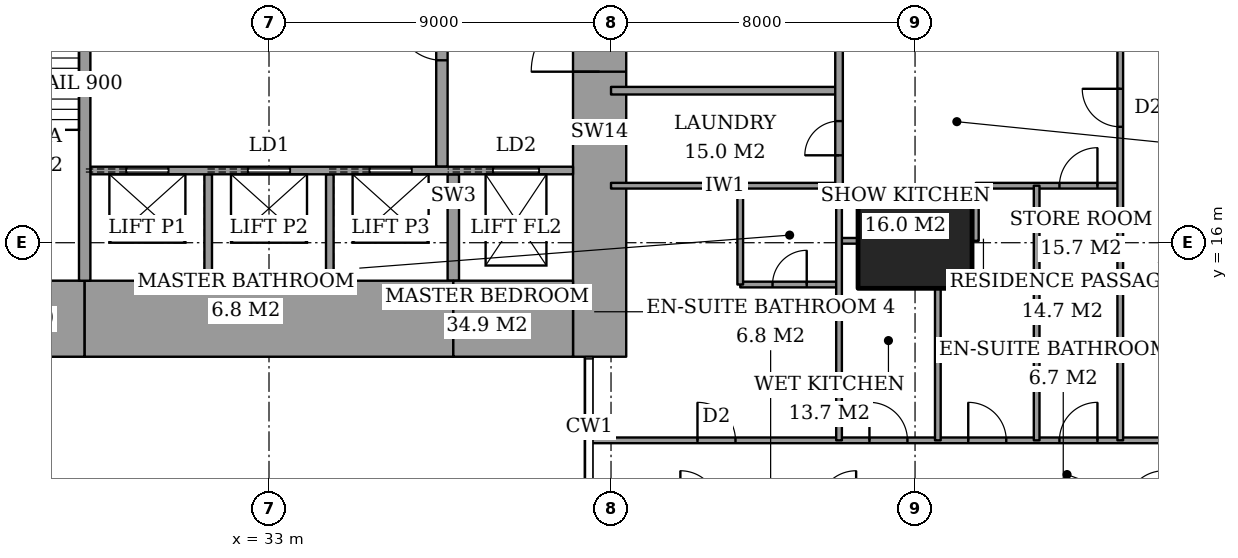
"""IFC4 building model, lengths in metres.
Left out: names, types, materials, properties, quantities, classifications, styles, units other than length and angle.
Written with IfcOpenShell. Run it as: python <this file> out.ifc"""

import sys

from ifc_helpers import new_model, si_unit, direction, frame, frame_2d, origin, origin_2d, place, context, subcontext, project, spatial, rectangle, extrude, element, fill, save


model = new_model("IFC4")
c1 = context("Model", 3, precision=1e-05, world=origin(), true_north=direction((0.0, 1.0)))
c2 = subcontext(c1, "Body", "Model", "MODEL_VIEW")
j1 = project(units=[si_unit("LENGTHUNIT", "METRE"), si_unit("PLANEANGLEUNIT", "RADIAN")], contexts=[c1])
p1 = place(None, origin())
s1 = spatial("IfcSite", under=j1, at=p1, CompositionType="ELEMENT")
p2 = place(p1, origin())
s2 = spatial("IfcBuilding", under=s1, at=p2, CompositionType="ELEMENT")
p3 = place(p2, frame((0.0, 0.0, 125.0)))
s3 = spatial("IfcBuildingStorey", under=s2, at=p3, CompositionType="ELEMENT", Elevation=125.0)
p4 = place(p3, frame((50.0, 16.0, 0.0), z_axis=(0.0, 0.0, 1.0), x_axis=(1.0, 0.0, 0.0)))
e1 = element("IfcColumn", 1, at=p4, inside=s3, PredefinedType="COLUMN", context=c2, shape_type="SweptSolid", body=[
    extrude(rectangle(XDim=3.0, YDim=2.4, at=origin_2d()), origin(), (0.0, 0.0, 1.0), 3.6),
])
p5 = place(p3, frame((25.0, 14.0, 0.0), z_axis=(0.0, 0.0, 1.0), x_axis=(1.0, 0.0, 0.0)))
e2 = element("IfcWall", 2, at=p5, inside=s3, PredefinedType="SHEAR", context=c2, shape_type="SweptSolid", body=[
    extrude(rectangle(XDim=3.15, YDim=2.0, at=frame_2d((1.575, 0.0))), origin(), (0.0, 0.0, 1.0), 3.6),
])
p6 = place(p3, frame((28.15, 14.0, 0.0), z_axis=(0.0, 0.0, 1.0), x_axis=(1.0, 0.0, 0.0)))
e3 = element("IfcWall", 3, at=p6, inside=s3, PredefinedType="SHEAR", context=c2, shape_type="SweptSolid", body=[
    extrude(rectangle(XDim=9.7, YDim=2.0, at=frame_2d((4.85, 0.0))), origin(), (0.0, 0.0, 1.0), 3.6),
])
p7 = place(p3, frame((37.85, 14.0, 0.0), z_axis=(0.0, 0.0, 1.0), x_axis=(1.0, 0.0, 0.0)))
e4 = element("IfcWall", 4, at=p7, inside=s3, PredefinedType="SHEAR", context=c2, shape_type="SweptSolid", body=[
    extrude(rectangle(XDim=3.15, YDim=2.0, at=frame_2d((1.575, 0.0))), origin(), (0.0, 0.0, 1.0), 3.6),
])
p8 = place(p3, frame((41.7, 13.0, 0.0), z_axis=(0.0, 0.0, 1.0), x_axis=(0.0, 1.0, 0.0)))
e5 = element("IfcWall", 5, at=p8, inside=s3, PredefinedType="SHEAR", context=c2, shape_type="SweptSolid", body=[
    extrude(rectangle(XDim=11.85, YDim=1.4, at=frame_2d((5.925, 0.0))), origin(), (0.0, 0.0, 1.0), 3.6),
])
p9 = place(p8, frame((7.5, 0.0, 0.0)))
e6 = element("IfcOpeningElement", 6, at=p9, cuts=e5, PredefinedType="OPENING", context=c2, shape_type="SweptSolid", body=[
    extrude(rectangle(XDim=1.8, YDim=2.4, at=frame_2d((0.9, 1.2))), frame((0.0, 0.71, 0.0), z_axis=(0.0, -1.0, 0.0), x_axis=(1.0, 0.0, 0.0)), (0.0, 0.0, 1.0), 1.42),
])
p10 = place(p3, frame((28.15, 15.0, 0.0), z_axis=(0.0, 0.0, 1.0), x_axis=(0.0, 1.0, 0.0)))
e7 = element("IfcWall", 7, at=p10, inside=s3, PredefinedType="SHEAR", context=c2, shape_type="SweptSolid", body=[
    extrude(rectangle(XDim=8.15, YDim=0.3, at=frame_2d((4.075, 0.0))), origin(), (0.0, 0.0, 1.0), 3.6),
])
p11 = place(p3, frame((37.55, 18.0, 0.0), z_axis=(0.0, 0.0, 1.0), x_axis=(0.0, 1.0, 0.0)))
e8 = element("IfcWall", 8, at=p11, inside=s3, PredefinedType="PARTITIONING", context=c2, shape_type="SweptSolid", body=[
    extrude(rectangle(XDim=6.7, YDim=0.3, at=frame_2d((3.35, 0.0))), origin(), (0.0, 0.0, 1.0), 3.6),
])
p12 = place(p11, frame((2.8, 0.0, 0.0)))
e9 = element("IfcOpeningElement", 9, at=p12, cuts=e8, PredefinedType="OPENING", context=c2, shape_type="SweptSolid", body=[
    extrude(rectangle(XDim=1.2, YDim=2.1, at=frame_2d((0.6, 1.05))), frame((0.0, 0.16, 0.0), z_axis=(0.0, -1.0, 0.0), x_axis=(1.0, 0.0, 0.0)), (0.0, 0.0, 1.0), 0.32),
])
p13 = place(p3, frame((41.439, 10.8, 0.0), z_axis=(0.0, 0.0, 1.0), x_axis=(1.0, 0.0, 0.0)))
e10 = element("IfcWall", 10, at=p13, inside=s3, PredefinedType="PARTITIONING", context=c2, shape_type="SweptSolid", body=[
    extrude(rectangle(XDim=25.011, YDim=0.15, at=frame_2d((12.505, 0.0))), origin(), (0.0, 0.0, 1.0), 3.35),
])
p14 = place(p13, frame((12.361, 0.0, 0.0)))
e11 = element("IfcOpeningElement", 11, at=p14, cuts=e10, PredefinedType="OPENING", context=c2, shape_type="SweptSolid", body=[
    extrude(rectangle(XDim=1.0, YDim=2.1, at=frame_2d((0.5, 1.05))), frame((0.0, 0.085, 0.0), z_axis=(0.0, -1.0, 0.0), x_axis=(1.0, 0.0, 0.0)), (0.0, 0.0, 1.0), 0.17),
])
p15 = place(p13, frame((20.924, 0.0, 0.0)))
e12 = element("IfcOpeningElement", 12, at=p15, cuts=e10, PredefinedType="OPENING", context=c2, shape_type="SweptSolid", body=[
    extrude(rectangle(XDim=1.0, YDim=2.1, at=frame_2d((0.5, 1.05))), frame((0.0, 0.085, 0.0), z_axis=(0.0, -1.0, 0.0), x_axis=(1.0, 0.0, 0.0)), (0.0, 0.0, 1.0), 0.17),
])
p16 = place(p13, frame((15.448, 0.0, 0.0)))
e13 = element("IfcOpeningElement", 13, at=p16, cuts=e10, PredefinedType="OPENING", context=c2, shape_type="SweptSolid", body=[
    extrude(rectangle(XDim=0.9, YDim=2.1, at=frame_2d((0.45, 1.05))), frame((0.0, 0.085, 0.0), z_axis=(0.0, -1.0, 0.0), x_axis=(1.0, 0.0, 0.0)), (0.0, 0.0, 1.0), 0.17),
])
p17 = place(p13, frame((9.961, 0.0, 0.0)))
e14 = element("IfcOpeningElement", 14, at=p17, cuts=e10, PredefinedType="OPENING", context=c2, shape_type="SweptSolid", body=[
    extrude(rectangle(XDim=1.0, YDim=2.1, at=frame_2d((0.5, 1.05))), frame((0.0, 0.085, 0.0), z_axis=(0.0, -1.0, 0.0), x_axis=(1.0, 0.0, 0.0)), (0.0, 0.0, 1.0), 0.17),
])
p18 = place(p13, frame((7.361, 0.0, 0.0)))
e15 = element("IfcOpeningElement", 15, at=p18, cuts=e10, PredefinedType="OPENING", context=c2, shape_type="SweptSolid", body=[
    extrude(rectangle(XDim=1.0, YDim=2.1, at=frame_2d((0.5, 1.05))), frame((0.0, 0.085, 0.0), z_axis=(0.0, -1.0, 0.0), x_axis=(1.0, 0.0, 0.0)), (0.0, 0.0, 1.0), 0.17),
])
p19 = place(p13, frame((2.836, 0.0, 0.0)))
e16 = element("IfcOpeningElement", 16, at=p19, cuts=e10, PredefinedType="OPENING", context=c2, shape_type="SweptSolid", body=[
    extrude(rectangle(XDim=1.0, YDim=2.1, at=frame_2d((0.5, 1.05))), frame((0.0, 0.085, 0.0), z_axis=(0.0, -1.0, 0.0), x_axis=(1.0, 0.0, 0.0)), (0.0, 0.0, 1.0), 0.17),
])
p20 = place(p3, frame((45.4, 14.9, 0.0), z_axis=(0.0, 0.0, 1.0), x_axis=(1.0, 0.0, 0.0)))
e17 = element("IfcWall", 17, at=p20, inside=s3, PredefinedType="PARTITIONING", context=c2, shape_type="SweptSolid", body=[
    extrude(rectangle(XDim=2.6, YDim=0.15, at=frame_2d((1.3, 0.0))), origin(), (0.0, 0.0, 1.0), 3.35),
])
p21 = place(p20, frame((0.85, 0.0, 0.0)))
e18 = element("IfcOpeningElement", 18, at=p21, cuts=e17, PredefinedType="OPENING", context=c2, shape_type="SweptSolid", body=[
    extrude(rectangle(XDim=0.9, YDim=2.1, at=frame_2d((0.45, 1.05))), frame((0.0, 0.085, 0.0), z_axis=(0.0, -1.0, 0.0), x_axis=(1.0, 0.0, 0.0)), (0.0, 0.0, 1.0), 0.17),
])
p22 = place(p3, frame((55.4, 15.0, 0.0), z_axis=(0.0, 0.0, 1.0), x_axis=(1.0, 0.0, 0.0)))
e19 = element("IfcWall", 19, at=p22, inside=s3, PredefinedType="PARTITIONING", context=c2, shape_type="SweptSolid", body=[
    extrude(rectangle(XDim=1.1, YDim=0.15, at=frame_2d((0.55, 0.0))), origin(), (0.0, 0.0, 1.0), 3.35),
])
p23 = place(p3, frame((48.0, 16.05, 0.0), z_axis=(0.0, 0.0, 1.0), x_axis=(1.0, 0.0, 0.0)))
e20 = element("IfcWall", 20, at=p23, inside=s3, PredefinedType="PARTITIONING", context=c2, shape_type="SweptSolid", body=[
    extrude(rectangle(XDim=0.5, YDim=0.15, at=frame_2d((0.25, 0.0))), origin(), (0.0, 0.0, 1.0), 2.634),
])
p24 = place(p3, frame((42.0, 17.5, 0.0), z_axis=(0.0, 0.0, 1.0), x_axis=(1.0, 0.0, 0.0)))
e21 = element("IfcWall", 21, at=p24, inside=s3, PredefinedType="PARTITIONING", context=c2, shape_type="SweptSolid", body=[
    extrude(rectangle(XDim=6.0, YDim=0.15, at=frame_2d((3.0, 0.0))), origin(), (0.0, 0.0, 1.0), 3.35),
])
p25 = place(p3, frame((51.6, 17.5, 0.0), z_axis=(0.0, 0.0, 1.0), x_axis=(1.0, 0.0, 0.0)))
e22 = element("IfcWall", 22, at=p25, inside=s3, PredefinedType="PARTITIONING", context=c2, shape_type="SweptSolid", body=[
    extrude(rectangle(XDim=3.8, YDim=0.15, at=frame_2d((1.9, 0.0))), origin(), (0.0, 0.0, 1.0), 3.35),
])
p26 = place(p25, frame((2.2, 0.0, 0.0)))
e23 = element("IfcOpeningElement", 23, at=p26, cuts=e22, PredefinedType="OPENING", context=c2, shape_type="SweptSolid", body=[
    extrude(rectangle(XDim=1.0, YDim=2.1, at=frame_2d((0.5, 1.05))), frame((0.0, 0.085, 0.0), z_axis=(0.0, -1.0, 0.0), x_axis=(1.0, 0.0, 0.0)), (0.0, 0.0, 1.0), 0.17),
])
p27 = place(p3, frame((42.0, 20.0, 0.0), z_axis=(0.0, 0.0, 1.0), x_axis=(1.0, 0.0, 0.0)))
e24 = element("IfcWall", 24, at=p27, inside=s3, PredefinedType="PARTITIONING", context=c2, shape_type="SweptSolid", body=[
    extrude(rectangle(XDim=6.0, YDim=0.2, at=frame_2d((3.0, 0.0))), origin(), (0.0, 0.0, 1.0), 3.35),
])
p28 = place(p3, frame((45.4, 14.9, 0.0), z_axis=(0.0, 0.0, 1.0), x_axis=(0.0, 1.0, 0.0)))
e25 = element("IfcWall", 25, at=p28, inside=s3, PredefinedType="PARTITIONING", context=c2, shape_type="SweptSolid", body=[
    extrude(rectangle(XDim=2.6, YDim=0.15, at=frame_2d((1.3, 0.0))), origin(), (0.0, 0.0, 1.0), 3.35),
])
p29 = place(p3, frame((48.0, 17.5, 0.0), z_axis=(0.0, 0.0, 1.0), x_axis=(0.0, 1.0, 0.0)))
e26 = element("IfcWall", 26, at=p29, inside=s3, PredefinedType="PARTITIONING", context=c2, shape_type="SweptSolid", body=[
    extrude(rectangle(XDim=6.5, YDim=0.2, at=frame_2d((3.25, 0.0))), origin(), (0.0, 0.0, 1.0), 3.35),
])
p30 = place(p29, frame((3.9, 0.0, 0.0)))
e27 = element("IfcOpeningElement", 27, at=p30, cuts=e26, PredefinedType="OPENING", context=c2, shape_type="SweptSolid", body=[
    extrude(rectangle(XDim=1.2, YDim=2.4, at=frame_2d((0.6, 1.2))), frame((0.0, 0.11, 0.0), z_axis=(0.0, -1.0, 0.0), x_axis=(1.0, 0.0, 0.0)), (0.0, 0.0, 1.0), 0.22),
])
p31 = place(p29, frame((0.8, 0.0, 0.0)))
e28 = element("IfcOpeningElement", 28, at=p31, cuts=e26, PredefinedType="OPENING", context=c2, shape_type="SweptSolid", body=[
    extrude(rectangle(XDim=0.9, YDim=2.1, at=frame_2d((0.45, 1.05))), frame((0.0, 0.11, 0.0), z_axis=(0.0, -1.0, 0.0), x_axis=(1.0, 0.0, 0.0)), (0.0, 0.0, 1.0), 0.22),
])
p32 = place(p3, frame((48.0, 10.8, 0.0), z_axis=(0.0, 0.0, 1.0), x_axis=(0.0, 1.0, 0.0)))
e29 = element("IfcWall", 29, at=p32, inside=s3, PredefinedType="PARTITIONING", context=c2, shape_type="SweptSolid", body=[
    extrude(rectangle(XDim=6.7, YDim=0.15, at=frame_2d((3.35, 0.0))), origin(), (0.0, 0.0, 1.0), 3.35),
])
p33 = place(p3, frame((50.6, 10.8, 0.0), z_axis=(0.0, 0.0, 1.0), x_axis=(0.0, 1.0, 0.0)))
e30 = element("IfcWall", 30, at=p33, inside=s3, PredefinedType="PARTITIONING", context=c2, shape_type="SweptSolid", body=[
    extrude(rectangle(XDim=4.0, YDim=0.15, at=frame_2d((2.0, 0.0))), origin(), (0.0, 0.0, 1.0), 3.35),
])
p34 = place(p3, frame((51.6, 16.05, 0.0), z_axis=(0.0, 0.0, 1.0), x_axis=(0.0, 1.0, 0.0)))
e31 = element("IfcWall", 31, at=p34, inside=s3, PredefinedType="PARTITIONING", context=c2, shape_type="SweptSolid", body=[
    extrude(rectangle(XDim=1.45, YDim=0.15, at=frame_2d((0.725, 0.0))), origin(), (0.0, 0.0, 1.0), 3.35),
])
p35 = place(p3, frame((53.2, 10.8, 0.0), z_axis=(0.0, 0.0, 1.0), x_axis=(0.0, 1.0, 0.0)))
e32 = element("IfcWall", 32, at=p35, inside=s3, PredefinedType="PARTITIONING", context=c2, shape_type="SweptSolid", body=[
    extrude(rectangle(XDim=6.7, YDim=0.15, at=frame_2d((3.35, 0.0))), origin(), (0.0, 0.0, 1.0), 3.35),
])
p36 = place(p3, frame((55.4, 10.8, 0.0), z_axis=(0.0, 0.0, 1.0), x_axis=(0.0, 1.0, 0.0)))
e33 = element("IfcWall", 33, at=p36, inside=s3, PredefinedType="PARTITIONING", context=c2, shape_type="SweptSolid", body=[
    extrude(rectangle(XDim=10.8, YDim=0.15, at=frame_2d((5.4, 0.0))), origin(), (0.0, 0.0, 1.0), 3.35),
])
p37 = place(p36, frame((8.25, 0.0, 0.0)))
e34 = element("IfcOpeningElement", 34, at=p37, cuts=e33, PredefinedType="OPENING", context=c2, shape_type="SweptSolid", body=[
    extrude(rectangle(XDim=1.0, YDim=2.1, at=frame_2d((0.5, 1.05))), frame((0.0, 0.085, 0.0), z_axis=(0.0, -1.0, 0.0), x_axis=(1.0, 0.0, 0.0)), (0.0, 0.0, 1.0), 0.17),
])
p38 = place(p3, frame((28.3, 17.9, 0.0), z_axis=(0.0, 0.0, 1.0), x_axis=(1.0, 0.0, 0.0)))
e35 = element("IfcWall", 35, at=p38, inside=s3, PredefinedType="PARTITIONING", context=c2, shape_type="SweptSolid", body=[
    extrude(rectangle(XDim=12.7, YDim=0.2, at=frame_2d((6.35, 0.0))), origin(), (0.0, 0.0, 1.0), 3.6),
])
p39 = place(p38, frame((0.95, 0.0, 0.0)))
e36 = element("IfcOpeningElement", 36, at=p39, cuts=e35, PredefinedType="OPENING", context=c2, shape_type="SweptSolid", body=[
    extrude(rectangle(XDim=1.1, YDim=2.1, at=frame_2d((0.55, 1.05))), frame((0.0, 0.11, 0.0), z_axis=(0.0, -1.0, 0.0), x_axis=(1.0, 0.0, 0.0)), (0.0, 0.0, 1.0), 0.22),
])
p40 = place(p38, frame((4.15, 0.0, 0.0)))
e37 = element("IfcOpeningElement", 37, at=p40, cuts=e35, PredefinedType="OPENING", context=c2, shape_type="SweptSolid", body=[
    extrude(rectangle(XDim=1.1, YDim=2.1, at=frame_2d((0.55, 1.05))), frame((0.0, 0.11, 0.0), z_axis=(0.0, -1.0, 0.0), x_axis=(1.0, 0.0, 0.0)), (0.0, 0.0, 1.0), 0.22),
])
p41 = place(p38, frame((7.35, 0.0, 0.0)))
e38 = element("IfcOpeningElement", 38, at=p41, cuts=e35, PredefinedType="OPENING", context=c2, shape_type="SweptSolid", body=[
    extrude(rectangle(XDim=1.1, YDim=2.1, at=frame_2d((0.55, 1.05))), frame((0.0, 0.11, 0.0), z_axis=(0.0, -1.0, 0.0), x_axis=(1.0, 0.0, 0.0)), (0.0, 0.0, 1.0), 0.22),
])
p42 = place(p38, frame((10.6, 0.0, 0.0)))
e39 = element("IfcOpeningElement", 39, at=p42, cuts=e35, PredefinedType="OPENING", context=c2, shape_type="SweptSolid", body=[
    extrude(rectangle(XDim=1.2, YDim=2.1, at=frame_2d((0.6, 1.05))), frame((0.0, 0.11, 0.0), z_axis=(0.0, -1.0, 0.0), x_axis=(1.0, 0.0, 0.0)), (0.0, 0.0, 1.0), 0.22),
])
for number, where, z_axis, x_axis in (
    (40, (31.4, 15.0, 0.0), (0.0, 0.0, 1.0), (0.0, 1.0, 0.0)),
    (41, (34.6, 15.0, 0.0), (0.0, 0.0, 1.0), (0.0, 1.0, 0.0)),
):
    element("IfcWall", number, at=place(p3, frame(where, z_axis=z_axis, x_axis=x_axis)), inside=s3, PredefinedType="PARTITIONING", context=c2, shape_type="SweptSolid", body=[
        extrude(rectangle(XDim=2.8, YDim=0.2, at=frame_2d((1.4, 0.0))), origin(), (0.0, 0.0, 1.0), 3.6),
    ])
p43 = place(p3, frame((37.85, 15.0, 0.0), z_axis=(0.0, 0.0, 1.0), x_axis=(0.0, 1.0, 0.0)))
e42 = element("IfcWall", 42, at=p43, inside=s3, PredefinedType="SHEAR", context=c2, shape_type="SweptSolid", body=[
    extrude(rectangle(XDim=2.8, YDim=0.3, at=frame_2d((1.4, 0.0))), origin(), (0.0, 0.0, 1.0), 3.6),
])
p44 = place(p14, origin())
e43 = element("IfcDoor", 43, at=p44, inside=s3, OperationType="SINGLE_SWING_LEFT", PredefinedType="DOOR", context=c2, shape_type="SweptSolid", body=[
    extrude(rectangle(XDim=1.0, YDim=2.1, at=frame_2d((0.5, 1.05))), frame((0.0, 0.025, 0.0), z_axis=(0.0, -1.0, 0.0), x_axis=(1.0, 0.0, 0.0)), (0.0, 0.0, 1.0), 0.05),
])
fill(e11, e43)
p45 = place(p37, origin())
e44 = element("IfcDoor", 44, at=p45, inside=s3, OperationType="SINGLE_SWING_LEFT", PredefinedType="DOOR", context=c2, shape_type="SweptSolid", body=[
    extrude(rectangle(XDim=1.0, YDim=2.1, at=frame_2d((0.5, 1.05))), frame((0.0, 0.025, 0.0), z_axis=(0.0, -1.0, 0.0), x_axis=(1.0, 0.0, 0.0)), (0.0, 0.0, 1.0), 0.05),
])
fill(e34, e44)
p46 = place(p26, origin())
e45 = element("IfcDoor", 45, at=p46, inside=s3, OperationType="SINGLE_SWING_LEFT", PredefinedType="DOOR", context=c2, shape_type="SweptSolid", body=[
    extrude(rectangle(XDim=1.0, YDim=2.1, at=frame_2d((0.5, 1.05))), frame((0.0, 0.025, 0.0), z_axis=(0.0, -1.0, 0.0), x_axis=(1.0, 0.0, 0.0)), (0.0, 0.0, 1.0), 0.05),
])
fill(e23, e45)
p47 = place(p17, origin())
e46 = element("IfcDoor", 46, at=p47, inside=s3, OperationType="SINGLE_SWING_RIGHT", PredefinedType="DOOR", context=c2, shape_type="SweptSolid", body=[
    extrude(rectangle(XDim=1.0, YDim=2.1, at=frame_2d((0.5, 1.05))), frame((0.0, 0.025, 0.0), z_axis=(0.0, -1.0, 0.0), x_axis=(1.0, 0.0, 0.0)), (0.0, 0.0, 1.0), 0.05),
])
fill(e14, e46)
p48 = place(p18, origin())
e47 = element("IfcDoor", 47, at=p48, inside=s3, OperationType="SINGLE_SWING_RIGHT", PredefinedType="DOOR", context=c2, shape_type="SweptSolid", body=[
    extrude(rectangle(XDim=1.0, YDim=2.1, at=frame_2d((0.5, 1.05))), frame((0.0, 0.025, 0.0), z_axis=(0.0, -1.0, 0.0), x_axis=(1.0, 0.0, 0.0)), (0.0, 0.0, 1.0), 0.05),
])
fill(e15, e47)
p49 = place(p21, origin())
e48 = element("IfcDoor", 48, at=p49, inside=s3, OperationType="SINGLE_SWING_LEFT", PredefinedType="DOOR", context=c2, shape_type="SweptSolid", body=[
    extrude(rectangle(XDim=0.9, YDim=2.1, at=frame_2d((0.45, 1.05))), frame((0.0, 0.025, 0.0), z_axis=(0.0, -1.0, 0.0), x_axis=(1.0, 0.0, 0.0)), (0.0, 0.0, 1.0), 0.05),
])
fill(e18, e48)
p50 = place(p19, origin())
e49 = element("IfcDoor", 49, at=p50, inside=s3, OperationType="SINGLE_SWING_RIGHT", PredefinedType="DOOR", context=c2, shape_type="SweptSolid", body=[
    extrude(rectangle(XDim=1.0, YDim=2.1, at=frame_2d((0.5, 1.05))), frame((0.0, 0.025, 0.0), z_axis=(0.0, -1.0, 0.0), x_axis=(1.0, 0.0, 0.0)), (0.0, 0.0, 1.0), 0.05),
])
fill(e16, e49)
p51 = place(p31, origin())
e50 = element("IfcDoor", 50, at=p51, inside=s3, OperationType="SINGLE_SWING_RIGHT", PredefinedType="DOOR", context=c2, shape_type="SweptSolid", body=[
    extrude(rectangle(XDim=0.9, YDim=2.1, at=frame_2d((0.45, 1.05))), frame((0.0, 0.025, 0.0), z_axis=(0.0, -1.0, 0.0), x_axis=(1.0, 0.0, 0.0)), (0.0, 0.0, 1.0), 0.05),
])
fill(e28, e50)
p52 = place(p12, origin())
e51 = element("IfcDoor", 51, at=p52, inside=s3, OperationType="SINGLE_SWING_LEFT", PredefinedType="DOOR", context=c2, shape_type="SweptSolid", body=[
    extrude(rectangle(XDim=1.2, YDim=2.1, at=frame_2d((0.6, 1.05))), frame((0.0, 0.025, 0.0), z_axis=(0.0, -1.0, 0.0), x_axis=(1.0, 0.0, 0.0)), (0.0, 0.0, 1.0), 0.05),
])
fill(e9, e51)
p53 = place(p9, origin())
e52 = element("IfcDoor", 52, at=p53, inside=s3, OperationType="DOUBLE_DOOR_DOUBLE_SWING", PredefinedType="DOOR", context=c2, shape_type="SweptSolid", body=[
    extrude(rectangle(XDim=1.8, YDim=2.4, at=frame_2d((0.9, 1.2))), frame((0.0, 0.025, 0.0), z_axis=(0.0, -1.0, 0.0), x_axis=(1.0, 0.0, 0.0)), (0.0, 0.0, 1.0), 0.05),
])
fill(e6, e52)
p54 = place(p39, origin())
e53 = element("IfcDoor", 53, at=p54, inside=s3, OperationType="SLIDING_TO_LEFT", PredefinedType="DOOR", context=c2, shape_type="SweptSolid", body=[
    extrude(rectangle(XDim=1.1, YDim=2.1, at=frame_2d((0.55, 1.05))), frame((0.0, 0.025, 0.0), z_axis=(0.0, -1.0, 0.0), x_axis=(1.0, 0.0, 0.0)), (0.0, 0.0, 1.0), 0.05),
])
fill(e36, e53)
p55 = place(p40, origin())
e54 = element("IfcDoor", 54, at=p55, inside=s3, OperationType="SLIDING_TO_LEFT", PredefinedType="DOOR", context=c2, shape_type="SweptSolid", body=[
    extrude(rectangle(XDim=1.1, YDim=2.1, at=frame_2d((0.55, 1.05))), frame((0.0, 0.025, 0.0), z_axis=(0.0, -1.0, 0.0), x_axis=(1.0, 0.0, 0.0)), (0.0, 0.0, 1.0), 0.05),
])
fill(e37, e54)
p56 = place(p41, origin())
e55 = element("IfcDoor", 55, at=p56, inside=s3, OperationType="SLIDING_TO_LEFT", PredefinedType="DOOR", context=c2, shape_type="SweptSolid", body=[
    extrude(rectangle(XDim=1.1, YDim=2.1, at=frame_2d((0.55, 1.05))), frame((0.0, 0.025, 0.0), z_axis=(0.0, -1.0, 0.0), x_axis=(1.0, 0.0, 0.0)), (0.0, 0.0, 1.0), 0.05),
])
fill(e38, e55)
p57 = place(p42, origin())
e56 = element("IfcDoor", 56, at=p57, inside=s3, OperationType="SLIDING_TO_LEFT", PredefinedType="DOOR", context=c2, shape_type="SweptSolid", body=[
    extrude(rectangle(XDim=1.2, YDim=2.1, at=frame_2d((0.6, 1.05))), frame((0.0, 0.025, 0.0), z_axis=(0.0, -1.0, 0.0), x_axis=(1.0, 0.0, 0.0)), (0.0, 0.0, 1.0), 0.05),
])
fill(e39, e56)
save(model, sys.argv[1])
